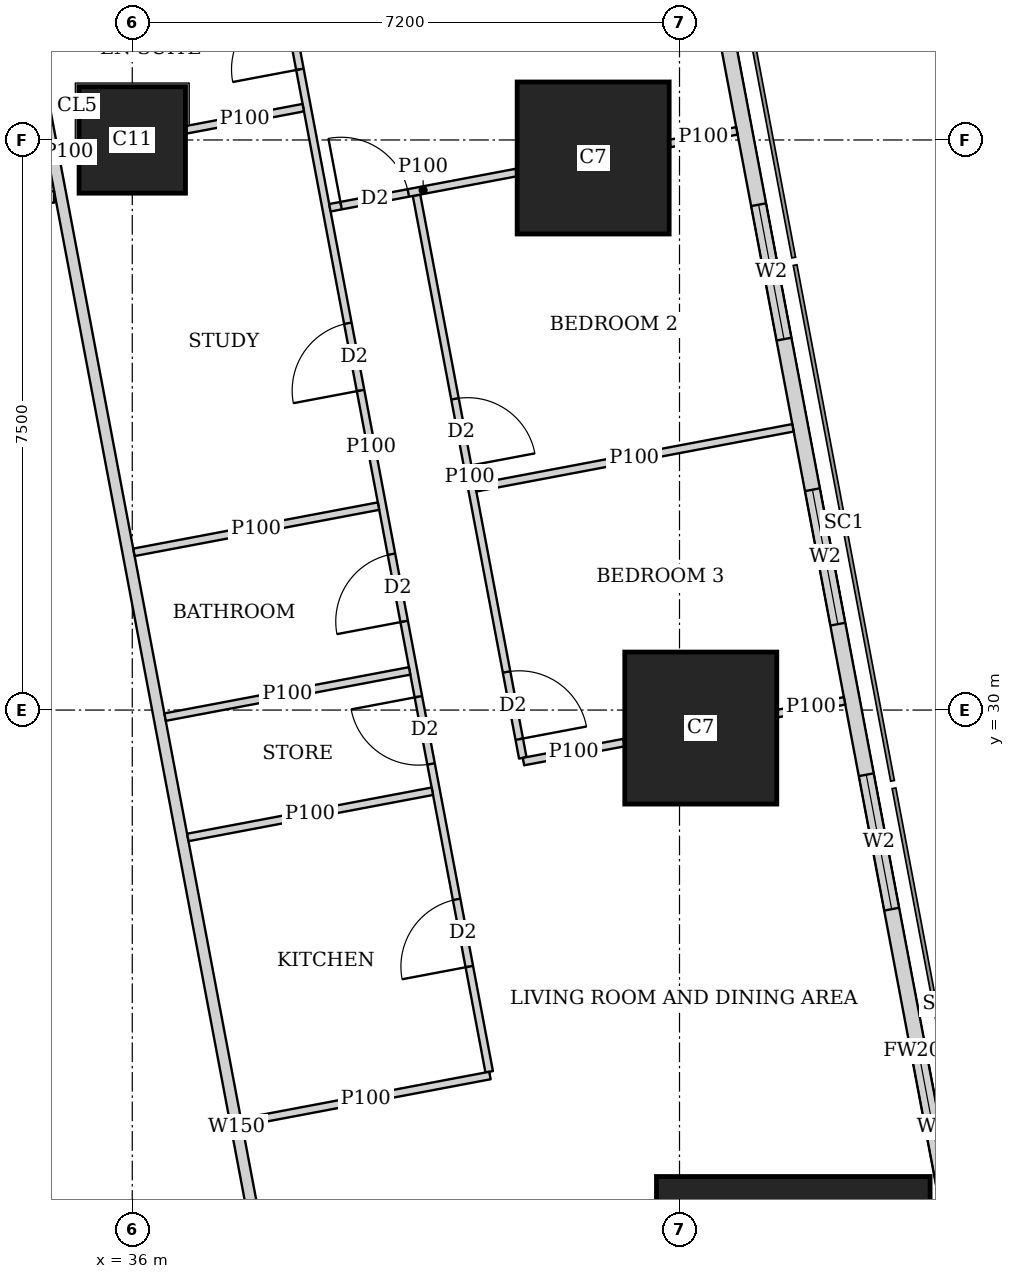
"""IFC4 building model, lengths in metres.
Left out: names, types, materials, properties, quantities, classifications, styles, units other than length and angle.
Written with IfcOpenShell. Run it as: python <this file> out.ifc"""

import sys

from ifc_helpers import new_model, si_unit, direction, frame, frame_2d, origin, origin_2d, place, context, subcontext, project, spatial, rectangle, extrude, element, fill, save


model = new_model("IFC4")
c1 = context("Model", 3, precision=1e-05, world=origin(), true_north=direction((0.0, 1.0)))
c2 = subcontext(c1, "Body", "Model", "MODEL_VIEW")
j1 = project(units=[si_unit("LENGTHUNIT", "METRE"), si_unit("PLANEANGLEUNIT", "RADIAN")], contexts=[c1])
p1 = place(None, origin())
s1 = spatial("IfcSite", under=j1, at=p1, CompositionType="ELEMENT")
p2 = place(p1, origin())
s2 = spatial("IfcBuilding", under=s1, at=p2, CompositionType="ELEMENT")
p3 = place(p2, frame((0.0, 0.0, 285.35)))
s3 = spatial("IfcBuildingStorey", under=s2, at=p3, CompositionType="ELEMENT", Elevation=285.35)
p4 = place(p3, frame((44.697, 22.263, 0.0), z_axis=(0.0, 0.0, 1.0), x_axis=(1.0, 0.0, 0.0)))
e1 = element("IfcColumn", 1, at=p4, inside=s3, PredefinedType="COLUMN", context=c2, shape_type="SweptSolid", body=[
    extrude(rectangle(XDim=3.6, YDim=3.2, at=origin_2d()), origin(), (0.0, 0.0, 1.0), 3.75),
])
p5 = place(p3, frame((43.48, 29.763, 0.0), z_axis=(0.0, 0.0, 1.0), x_axis=(1.0, 0.0, 0.0)))
e2 = element("IfcColumn", 2, at=p5, inside=s3, PredefinedType="COLUMN", context=c2, shape_type="SweptSolid", body=[
    extrude(rectangle(XDim=2.0, YDim=2.0, at=origin_2d()), origin(), (0.0, 0.0, 1.0), 3.75),
])
p6 = place(p3, frame((36.0, 37.5, 0.0), z_axis=(0.0, 0.0, 1.0), x_axis=(1.0, 0.0, 0.0)))
e3 = element("IfcColumn", 3, at=p6, inside=s3, PredefinedType="COLUMN", context=c2, shape_type="SweptSolid", body=[
    extrude(rectangle(XDim=1.4, YDim=1.4, at=origin_2d()), origin(), (0.0, 0.0, 1.0), 3.75),
])
p7 = place(p3, frame((42.064, 37.263, 0.0), z_axis=(0.0, 0.0, 1.0), x_axis=(1.0, 0.0, 0.0)))
e4 = element("IfcColumn", 4, at=p7, inside=s3, PredefinedType="COLUMN", context=c2, shape_type="SweptSolid", body=[
    extrude(rectangle(XDim=2.0, YDim=2.0, at=origin_2d()), origin(), (0.0, 0.0, 1.0), 3.75),
])
p8 = place(p3, frame((49.684, 7.832, 0.0), z_axis=(0.0, 0.0, 1.0), x_axis=(-0.185616669694, 0.982622232565, 0.0)))
e5 = element("IfcWall", 5, at=p8, inside=s3, PredefinedType="SOLIDWALL", context=c2, shape_type="SweptSolid", body=[
    extrude(rectangle(XDim=36.0, YDim=0.2, at=frame_2d((18.0, 0.0))), origin(), (0.0, 0.0, 1.0), 3.5),
])
p9 = place(p8, frame((2.518, 0.0, 0.9)))
e6 = element("IfcOpeningElement", 6, at=p9, cuts=e5, PredefinedType="OPENING", context=c2, shape_type="SweptSolid", body=[
    extrude(rectangle(XDim=2.4, YDim=1.5, at=frame_2d((1.2, 0.75))), frame((0.0, 0.11, 0.0), z_axis=(0.0, -1.0, 0.0), x_axis=(1.0, 0.0, 0.0)), (0.0, 0.0, 1.0), 0.22),
])
p10 = place(p8, frame((8.444, 0.0, 0.9)))
e7 = element("IfcOpeningElement", 7, at=p10, cuts=e5, PredefinedType="OPENING", context=c2, shape_type="SweptSolid", body=[
    extrude(rectangle(XDim=1.8, YDim=1.5, at=frame_2d((0.9, 0.75))), frame((0.0, 0.11, 0.0), z_axis=(0.0, -1.0, 0.0), x_axis=(1.0, 0.0, 0.0)), (0.0, 0.0, 1.0), 0.22),
])
p11 = place(p8, frame((12.261, 0.0, 0.9)))
e8 = element("IfcOpeningElement", 8, at=p11, cuts=e5, PredefinedType="OPENING", context=c2, shape_type="SweptSolid", body=[
    extrude(rectangle(XDim=1.8, YDim=1.5, at=frame_2d((0.9, 0.75))), frame((0.0, 0.11, 0.0), z_axis=(0.0, -1.0, 0.0), x_axis=(1.0, 0.0, 0.0)), (0.0, 0.0, 1.0), 0.22),
])
p12 = place(p8, frame((16.078, 0.0, 0.9)))
e9 = element("IfcOpeningElement", 9, at=p12, cuts=e5, PredefinedType="OPENING", context=c2, shape_type="SweptSolid", body=[
    extrude(rectangle(XDim=1.8, YDim=1.5, at=frame_2d((0.9, 0.75))), frame((0.0, 0.11, 0.0), z_axis=(0.0, -1.0, 0.0), x_axis=(1.0, 0.0, 0.0)), (0.0, 0.0, 1.0), 0.22),
])
p13 = place(p8, frame((19.894, 0.0, 0.9)))
e10 = element("IfcOpeningElement", 10, at=p13, cuts=e5, PredefinedType="OPENING", context=c2, shape_type="SweptSolid", body=[
    extrude(rectangle(XDim=1.8, YDim=1.5, at=frame_2d((0.9, 0.75))), frame((0.0, 0.11, 0.0), z_axis=(0.0, -1.0, 0.0), x_axis=(1.0, 0.0, 0.0)), (0.0, 0.0, 1.0), 0.22),
])
p14 = place(p8, frame((23.71, 0.0, 0.9)))
e11 = element("IfcOpeningElement", 11, at=p14, cuts=e5, PredefinedType="OPENING", context=c2, shape_type="SweptSolid", body=[
    extrude(rectangle(XDim=1.8, YDim=1.5, at=frame_2d((0.9, 0.75))), frame((0.0, 0.11, 0.0), z_axis=(0.0, -1.0, 0.0), x_axis=(1.0, 0.0, 0.0)), (0.0, 0.0, 1.0), 0.22),
])
p15 = place(p8, frame((27.526, 0.0, 0.9)))
e12 = element("IfcOpeningElement", 12, at=p15, cuts=e5, PredefinedType="OPENING", context=c2, shape_type="SweptSolid", body=[
    extrude(rectangle(XDim=1.8, YDim=1.5, at=frame_2d((0.9, 0.75))), frame((0.0, 0.11, 0.0), z_axis=(0.0, -1.0, 0.0), x_axis=(1.0, 0.0, 0.0)), (0.0, 0.0, 1.0), 0.22),
])
p16 = place(p8, frame((32.046, 0.0, 0.9)))
e13 = element("IfcOpeningElement", 13, at=p16, cuts=e5, PredefinedType="OPENING", context=c2, shape_type="SweptSolid", body=[
    extrude(rectangle(XDim=1.8, YDim=1.5, at=frame_2d((0.9, 0.75))), frame((0.0, 0.11, 0.0), z_axis=(0.0, -1.0, 0.0), x_axis=(1.0, 0.0, 0.0)), (0.0, 0.0, 1.0), 0.22),
])
p17 = place(p3, frame((29.501, 36.75, 0.0), z_axis=(0.0, 0.0, 1.0), x_axis=(1.0, 0.0, 0.0)))
e14 = element("IfcWall", 14, at=p17, inside=s3, PredefinedType="SOLIDWALL", context=c2, shape_type="SweptSolid", body=[
    extrude(rectangle(XDim=5.471, YDim=0.15, at=frame_2d((2.735, 0.0))), origin(), (0.0, 0.0, 1.0), 3.5),
])
p18 = place(p3, frame((34.036, 42.186, 0.0), z_axis=(0.0, 0.0, 1.0), x_axis=(0.185593518645, -0.9826266055, 0.0)))
e15 = element("IfcWall", 15, at=p18, inside=s3, PredefinedType="SOLIDWALL", context=c2, shape_type="SweptSolid", body=[
    extrude(rectangle(XDim=35.961, YDim=0.15, at=frame_2d((17.98, 0.0))), origin(), (0.0, 0.0, 1.0), 2.5),
])
p19 = place(p18, frame((19.345, 0.0, 0.0)))
e16 = element("IfcOpeningElement", 16, at=p19, cuts=e15, PredefinedType="OPENING", context=c2, shape_type="SweptSolid", body=[
    extrude(rectangle(XDim=1.0, YDim=2.1, at=frame_2d((0.5, 1.05))), frame((0.0, 0.085, 0.0), z_axis=(0.0, -1.0, 0.0), x_axis=(1.0, 0.0, 0.0)), (0.0, 0.0, 1.0), 0.17),
])
p20 = place(p18, frame((33.774, 0.0, 0.0)))
e17 = element("IfcOpeningElement", 17, at=p20, cuts=e15, PredefinedType="OPENING", context=c2, shape_type="SweptSolid", body=[
    extrude(rectangle(XDim=1.0, YDim=2.1, at=frame_2d((0.5, 1.05))), frame((0.0, 0.085, 0.0), z_axis=(0.0, -1.0, 0.0), x_axis=(1.0, 0.0, 0.0)), (0.0, 0.0, 1.0), 0.17),
])
p21 = place(p3, frame((43.955, 37.62, 0.0), z_axis=(0.0, 0.0, 1.0), x_axis=(-0.982708424405, -0.18515980288, 0.0)))
e18 = element("IfcWall", 18, at=p21, inside=s3, PredefinedType="PARTITIONING", context=c2, shape_type="SweptSolid", body=[
    extrude(rectangle(XDim=0.897, YDim=0.1, at=frame_2d((0.448, 0.0))), origin(), (0.0, 0.0, 1.0), 3.5),
])
p22 = place(p3, frame((41.054, 37.072, 0.0), z_axis=(0.0, 0.0, 1.0), x_axis=(-0.982579896219, -0.185840650951, 0.0)))
e19 = element("IfcWall", 19, at=p22, inside=s3, PredefinedType="PARTITIONING", context=c2, shape_type="SweptSolid", body=[
    extrude(rectangle(XDim=2.497, YDim=0.1, at=frame_2d((1.249, 0.0))), origin(), (0.0, 0.0, 1.0), 3.5),
])
p23 = place(p22, frame((1.447, 0.0, 0.0)))
e20 = element("IfcOpeningElement", 20, at=p23, cuts=e19, PredefinedType="OPENING", context=c2, shape_type="SweptSolid", body=[
    extrude(rectangle(XDim=0.9, YDim=2.1, at=frame_2d((0.45, 1.05))), frame((0.0, 0.06, 0.0), z_axis=(0.0, -1.0, 0.0), x_axis=(1.0, 0.0, 0.0)), (0.0, 0.0, 1.0), 0.12),
])
p24 = place(p3, frame((44.693, 33.713, 0.0), z_axis=(0.0, 0.0, 1.0), x_axis=(-0.982623519589, -0.185609856287, 0.0)))
e21 = element("IfcWall", 21, at=p24, inside=s3, PredefinedType="PARTITIONING", context=c2, shape_type="SweptSolid", body=[
    extrude(rectangle(XDim=4.25, YDim=0.1, at=frame_2d((2.125, 0.0))), origin(), (0.0, 0.0, 1.0), 2.5),
])
p25 = place(p3, frame((45.372, 30.121, 0.0), z_axis=(0.0, 0.0, 1.0), x_axis=(-0.982547416156, -0.186012297994, 0.0)))
e22 = element("IfcWall", 22, at=p25, inside=s3, PredefinedType="PARTITIONING", context=c2, shape_type="SweptSolid", body=[
    extrude(rectangle(XDim=0.898, YDim=0.1, at=frame_2d((0.449, 0.0))), origin(), (0.0, 0.0, 1.0), 3.5),
])
p26 = place(p3, frame((42.47, 29.572, 0.0), z_axis=(0.0, 0.0, 1.0), x_axis=(-0.982610503289, -0.185678751683, 0.0)))
e23 = element("IfcWall", 23, at=p26, inside=s3, PredefinedType="PARTITIONING", context=c2, shape_type="SweptSolid", body=[
    extrude(rectangle(XDim=1.346, YDim=0.1, at=frame_2d((0.673, 0.0))), origin(), (0.0, 0.0, 1.0), 2.5),
])
p27 = place(p3, frame((38.25, 37.925, 0.0), z_axis=(0.0, 0.0, 1.0), x_axis=(-0.982610209589, -0.185680305934, 0.0)))
e24 = element("IfcWall", 24, at=p27, inside=s3, PredefinedType="PARTITIONING", context=c2, shape_type="SweptSolid", body=[
    extrude(rectangle(XDim=1.567, YDim=0.1, at=frame_2d((0.784, 0.0))), origin(), (0.0, 0.0, 1.0), 3.5),
])
p28 = place(p3, frame((35.29, 37.366, 0.0), z_axis=(0.0, 0.0, 1.0), x_axis=(-0.982395465615, -0.18681313963, 0.0)))
e25 = element("IfcWall", 25, at=p28, inside=s3, PredefinedType="PARTITIONING", context=c2, shape_type="SweptSolid", body=[
    extrude(rectangle(XDim=0.263, YDim=0.1, at=frame_2d((0.131, 0.0))), origin(), (0.0, 0.0, 1.0), 3.5),
])
p29 = place(p3, frame((39.24, 32.683, 0.0), z_axis=(0.0, 0.0, 1.0), x_axis=(-0.982607026909, -0.185697147715, 0.0)))
e26 = element("IfcWall", 26, at=p29, inside=s3, PredefinedType="PARTITIONING", context=c2, shape_type="SweptSolid", body=[
    extrude(rectangle(XDim=3.275, YDim=0.1, at=frame_2d((1.637, 0.0))), origin(), (0.0, 0.0, 1.0), 3.5),
])
p30 = place(p3, frame((39.948, 28.932, 0.0), z_axis=(0.0, 0.0, 1.0), x_axis=(-0.982610347627, -0.185679575441, 0.0)))
e27 = element("IfcWall", 27, at=p30, inside=s3, PredefinedType="PARTITIONING", context=c2, shape_type="SweptSolid", body=[
    extrude(rectangle(XDim=3.274, YDim=0.1, at=frame_2d((1.637, 0.0))), origin(), (0.0, 0.0, 1.0), 3.5),
])
p31 = place(p3, frame((40.706, 25.192, 0.0), z_axis=(0.0, 0.0, 1.0), x_axis=(-0.982633623707, -0.185556356831, 0.0)))
e28 = element("IfcWall", 28, at=p31, inside=s3, PredefinedType="PARTITIONING", context=c2, shape_type="SweptSolid", body=[
    extrude(rectangle(XDim=3.325, YDim=0.1, at=frame_2d((1.663, 0.0))), origin(), (0.0, 0.0, 1.0), 3.5),
])
p32 = place(p3, frame((39.649, 30.515, 0.0), z_axis=(0.0, 0.0, 1.0), x_axis=(-0.982610347627, -0.185679575441, 0.0)))
e29 = element("IfcWall", 29, at=p32, inside=s3, PredefinedType="PARTITIONING", context=c2, shape_type="SweptSolid", body=[
    extrude(rectangle(XDim=3.274, YDim=0.1, at=frame_2d((1.637, 0.0))), origin(), (0.0, 0.0, 1.0), 2.5),
])
p33 = place(p3, frame((37.591, 41.685, 0.0), z_axis=(0.0, 0.0, 1.0), x_axis=(0.185541820726, -0.982636368532, 0.0)))
e30 = element("IfcWall", 30, at=p33, inside=s3, PredefinedType="PARTITIONING", context=c2, shape_type="SweptSolid", body=[
    extrude(rectangle(XDim=16.735, YDim=0.1, at=frame_2d((8.367, 0.0))), origin(), (0.0, 0.0, 1.0), 2.5),
])
p34 = place(p33, frame((2.413, 0.0, 0.0)))
e31 = element("IfcOpeningElement", 31, at=p34, cuts=e30, PredefinedType="OPENING", context=c2, shape_type="SweptSolid", body=[
    extrude(rectangle(XDim=0.9, YDim=2.1, at=frame_2d((0.45, 1.05))), frame((0.0, 0.06, 0.0), z_axis=(0.0, -1.0, 0.0), x_axis=(1.0, 0.0, 0.0)), (0.0, 0.0, 1.0), 0.12),
])
p35 = place(p33, frame((6.713, 0.0, 0.0)))
e32 = element("IfcOpeningElement", 32, at=p35, cuts=e30, PredefinedType="OPENING", context=c2, shape_type="SweptSolid", body=[
    extrude(rectangle(XDim=0.9, YDim=2.1, at=frame_2d((0.45, 1.05))), frame((0.0, 0.06, 0.0), z_axis=(0.0, -1.0, 0.0), x_axis=(1.0, 0.0, 0.0)), (0.0, 0.0, 1.0), 0.12),
])
p36 = place(p33, frame((9.805, 0.0, 0.0)))
e33 = element("IfcOpeningElement", 33, at=p36, cuts=e30, PredefinedType="OPENING", context=c2, shape_type="SweptSolid", body=[
    extrude(rectangle(XDim=0.9, YDim=2.1, at=frame_2d((0.45, 1.05))), frame((0.0, 0.06, 0.0), z_axis=(0.0, -1.0, 0.0), x_axis=(1.0, 0.0, 0.0)), (0.0, 0.0, 1.0), 0.12),
])
p37 = place(p33, frame((11.713, 0.0, 0.0)))
e34 = element("IfcOpeningElement", 34, at=p37, cuts=e30, PredefinedType="OPENING", context=c2, shape_type="SweptSolid", body=[
    extrude(rectangle(XDim=0.9, YDim=2.1, at=frame_2d((0.45, 1.05))), frame((0.0, 0.06, 0.0), z_axis=(0.0, -1.0, 0.0), x_axis=(1.0, 0.0, 0.0)), (0.0, 0.0, 1.0), 0.12),
])
p38 = place(p33, frame((14.426, 0.0, 0.0)))
e35 = element("IfcOpeningElement", 35, at=p38, cuts=e30, PredefinedType="OPENING", context=c2, shape_type="SweptSolid", body=[
    extrude(rectangle(XDim=0.9, YDim=2.1, at=frame_2d((0.45, 1.05))), frame((0.0, 0.06, 0.0), z_axis=(0.0, -1.0, 0.0), x_axis=(1.0, 0.0, 0.0)), (0.0, 0.0, 1.0), 0.12),
])
p39 = place(p3, frame((39.74, 36.773, 0.0), z_axis=(0.0, 0.0, 1.0), x_axis=(0.185583825641, -0.982628436216, 0.0)))
e36 = element("IfcWall", 36, at=p39, inside=s3, PredefinedType="PARTITIONING", context=c2, shape_type="SweptSolid", body=[
    extrude(rectangle(XDim=7.533, YDim=0.1, at=frame_2d((3.766, 0.0))), origin(), (0.0, 0.0, 1.0), 2.5),
])
p40 = place(p39, frame((2.726, 0.0, 0.0)))
e37 = element("IfcOpeningElement", 37, at=p40, cuts=e36, PredefinedType="OPENING", context=c2, shape_type="SweptSolid", body=[
    extrude(rectangle(XDim=0.9, YDim=2.1, at=frame_2d((0.45, 1.05))), frame((0.0, 0.06, 0.0), z_axis=(0.0, -1.0, 0.0), x_axis=(1.0, 0.0, 0.0)), (0.0, 0.0, 1.0), 0.12),
])
p41 = place(p39, frame((6.383, 0.0, 0.0)))
e38 = element("IfcOpeningElement", 38, at=p41, cuts=e36, PredefinedType="OPENING", context=c2, shape_type="SweptSolid", body=[
    extrude(rectangle(XDim=0.9, YDim=2.1, at=frame_2d((0.45, 1.05))), frame((0.0, 0.06, 0.0), z_axis=(0.0, -1.0, 0.0), x_axis=(1.0, 0.0, 0.0)), (0.0, 0.0, 1.0), 0.12),
])
p42 = place(p3, frame((35.83, 15.713, 0.0), z_axis=(0.0, 0.0, 1.0), x_axis=(-0.185534724166, 0.982637708481, 0.0)))
e39 = element("IfcWall", 39, at=p42, inside=s3, PredefinedType="PARTITIONING", context=c2, shape_type="SweptSolid", body=[
    extrude(rectangle(XDim=13.814, YDim=0.125, at=frame_2d((6.907, 0.0))), origin(), (0.0, 0.0, 1.0), 2.5),
])
p43 = place(p42, frame((5.35, 0.0, 0.0)))
e40 = element("IfcOpeningElement", 40, at=p43, cuts=e39, PredefinedType="OPENING", context=c2, shape_type="SweptSolid", body=[
    extrude(rectangle(XDim=1.0, YDim=2.1, at=frame_2d((0.5, 1.05))), frame((0.0, 0.073, 0.0), z_axis=(0.0, -1.0, 0.0), x_axis=(1.0, 0.0, 0.0)), (0.0, 0.0, 1.0), 0.145),
])
p44 = place(p12, origin())
e41 = element("IfcWindow", 41, at=p44, inside=s3, PartitioningType="SINGLE_PANEL", PredefinedType="WINDOW", context=c2, shape_type="SweptSolid", body=[
    extrude(rectangle(XDim=1.8, YDim=1.5, at=frame_2d((0.9, 0.75))), frame((0.0, 0.03, 0.0), z_axis=(0.0, -1.0, 0.0), x_axis=(1.0, 0.0, 0.0)), (0.0, 0.0, 1.0), 0.06),
])
fill(e9, e41)
p45 = place(p13, origin())
e42 = element("IfcWindow", 42, at=p45, inside=s3, PartitioningType="SINGLE_PANEL", PredefinedType="WINDOW", context=c2, shape_type="SweptSolid", body=[
    extrude(rectangle(XDim=1.8, YDim=1.5, at=frame_2d((0.9, 0.75))), frame((0.0, 0.03, 0.0), z_axis=(0.0, -1.0, 0.0), x_axis=(1.0, 0.0, 0.0)), (0.0, 0.0, 1.0), 0.06),
])
fill(e10, e42)
p46 = place(p14, origin())
e43 = element("IfcWindow", 43, at=p46, inside=s3, PartitioningType="SINGLE_PANEL", PredefinedType="WINDOW", context=c2, shape_type="SweptSolid", body=[
    extrude(rectangle(XDim=1.8, YDim=1.5, at=frame_2d((0.9, 0.75))), frame((0.0, 0.03, 0.0), z_axis=(0.0, -1.0, 0.0), x_axis=(1.0, 0.0, 0.0)), (0.0, 0.0, 1.0), 0.06),
])
fill(e11, e43)
p47 = place(p15, origin())
e44 = element("IfcWindow", 44, at=p47, inside=s3, PartitioningType="SINGLE_PANEL", PredefinedType="WINDOW", context=c2, shape_type="SweptSolid", body=[
    extrude(rectangle(XDim=1.8, YDim=1.5, at=frame_2d((0.9, 0.75))), frame((0.0, 0.03, 0.0), z_axis=(0.0, -1.0, 0.0), x_axis=(1.0, 0.0, 0.0)), (0.0, 0.0, 1.0), 0.06),
])
fill(e12, e44)
p48 = place(p23, origin())
e45 = element("IfcDoor", 45, at=p48, inside=s3, OperationType="SINGLE_SWING_LEFT", PredefinedType="DOOR", context=c2, shape_type="SweptSolid", body=[
    extrude(rectangle(XDim=0.9, YDim=2.1, at=frame_2d((0.45, 1.05))), frame((0.0, 0.025, 0.0), z_axis=(0.0, -1.0, 0.0), x_axis=(1.0, 0.0, 0.0)), (0.0, 0.0, 1.0), 0.05),
])
fill(e20, e45)
p49 = place(p34, origin())
e46 = element("IfcDoor", 46, at=p49, inside=s3, OperationType="SINGLE_SWING_LEFT", PredefinedType="DOOR", context=c2, shape_type="SweptSolid", body=[
    extrude(rectangle(XDim=0.9, YDim=2.1, at=frame_2d((0.45, 1.05))), frame((0.0, 0.025, 0.0), z_axis=(0.0, -1.0, 0.0), x_axis=(1.0, 0.0, 0.0)), (0.0, 0.0, 1.0), 0.05),
])
fill(e31, e46)
p50 = place(p35, origin())
e47 = element("IfcDoor", 47, at=p50, inside=s3, OperationType="SINGLE_SWING_LEFT", PredefinedType="DOOR", context=c2, shape_type="SweptSolid", body=[
    extrude(rectangle(XDim=0.9, YDim=2.1, at=frame_2d((0.45, 1.05))), frame((0.0, 0.025, 0.0), z_axis=(0.0, -1.0, 0.0), x_axis=(1.0, 0.0, 0.0)), (0.0, 0.0, 1.0), 0.05),
])
fill(e32, e47)
p51 = place(p36, origin())
e48 = element("IfcDoor", 48, at=p51, inside=s3, OperationType="SINGLE_SWING_LEFT", PredefinedType="DOOR", context=c2, shape_type="SweptSolid", body=[
    extrude(rectangle(XDim=0.9, YDim=2.1, at=frame_2d((0.45, 1.05))), frame((0.0, 0.025, 0.0), z_axis=(0.0, -1.0, 0.0), x_axis=(1.0, 0.0, 0.0)), (0.0, 0.0, 1.0), 0.05),
])
fill(e33, e48)
p52 = place(p37, origin())
e49 = element("IfcDoor", 49, at=p52, inside=s3, OperationType="SINGLE_SWING_RIGHT", PredefinedType="DOOR", context=c2, shape_type="SweptSolid", body=[
    extrude(rectangle(XDim=0.9, YDim=2.1, at=frame_2d((0.45, 1.05))), frame((0.0, 0.025, 0.0), z_axis=(0.0, -1.0, 0.0), x_axis=(1.0, 0.0, 0.0)), (0.0, 0.0, 1.0), 0.05),
])
fill(e34, e49)
p53 = place(p38, origin())
e50 = element("IfcDoor", 50, at=p53, inside=s3, OperationType="SINGLE_SWING_LEFT", PredefinedType="DOOR", context=c2, shape_type="SweptSolid", body=[
    extrude(rectangle(XDim=0.9, YDim=2.1, at=frame_2d((0.45, 1.05))), frame((0.0, 0.025, 0.0), z_axis=(0.0, -1.0, 0.0), x_axis=(1.0, 0.0, 0.0)), (0.0, 0.0, 1.0), 0.05),
])
fill(e35, e50)
p54 = place(p40, origin())
e51 = element("IfcDoor", 51, at=p54, inside=s3, OperationType="SINGLE_SWING_RIGHT", PredefinedType="DOOR", context=c2, shape_type="SweptSolid", body=[
    extrude(rectangle(XDim=0.9, YDim=2.1, at=frame_2d((0.45, 1.05))), frame((0.0, 0.025, 0.0), z_axis=(0.0, -1.0, 0.0), x_axis=(1.0, 0.0, 0.0)), (0.0, 0.0, 1.0), 0.05),
])
fill(e37, e51)
p55 = place(p41, origin())
e52 = element("IfcDoor", 52, at=p55, inside=s3, OperationType="SINGLE_SWING_RIGHT", PredefinedType="DOOR", context=c2, shape_type="SweptSolid", body=[
    extrude(rectangle(XDim=0.9, YDim=2.1, at=frame_2d((0.45, 1.05))), frame((0.0, 0.025, 0.0), z_axis=(0.0, -1.0, 0.0), x_axis=(1.0, 0.0, 0.0)), (0.0, 0.0, 1.0), 0.05),
])
fill(e38, e52)
save(model, sys.argv[1])
